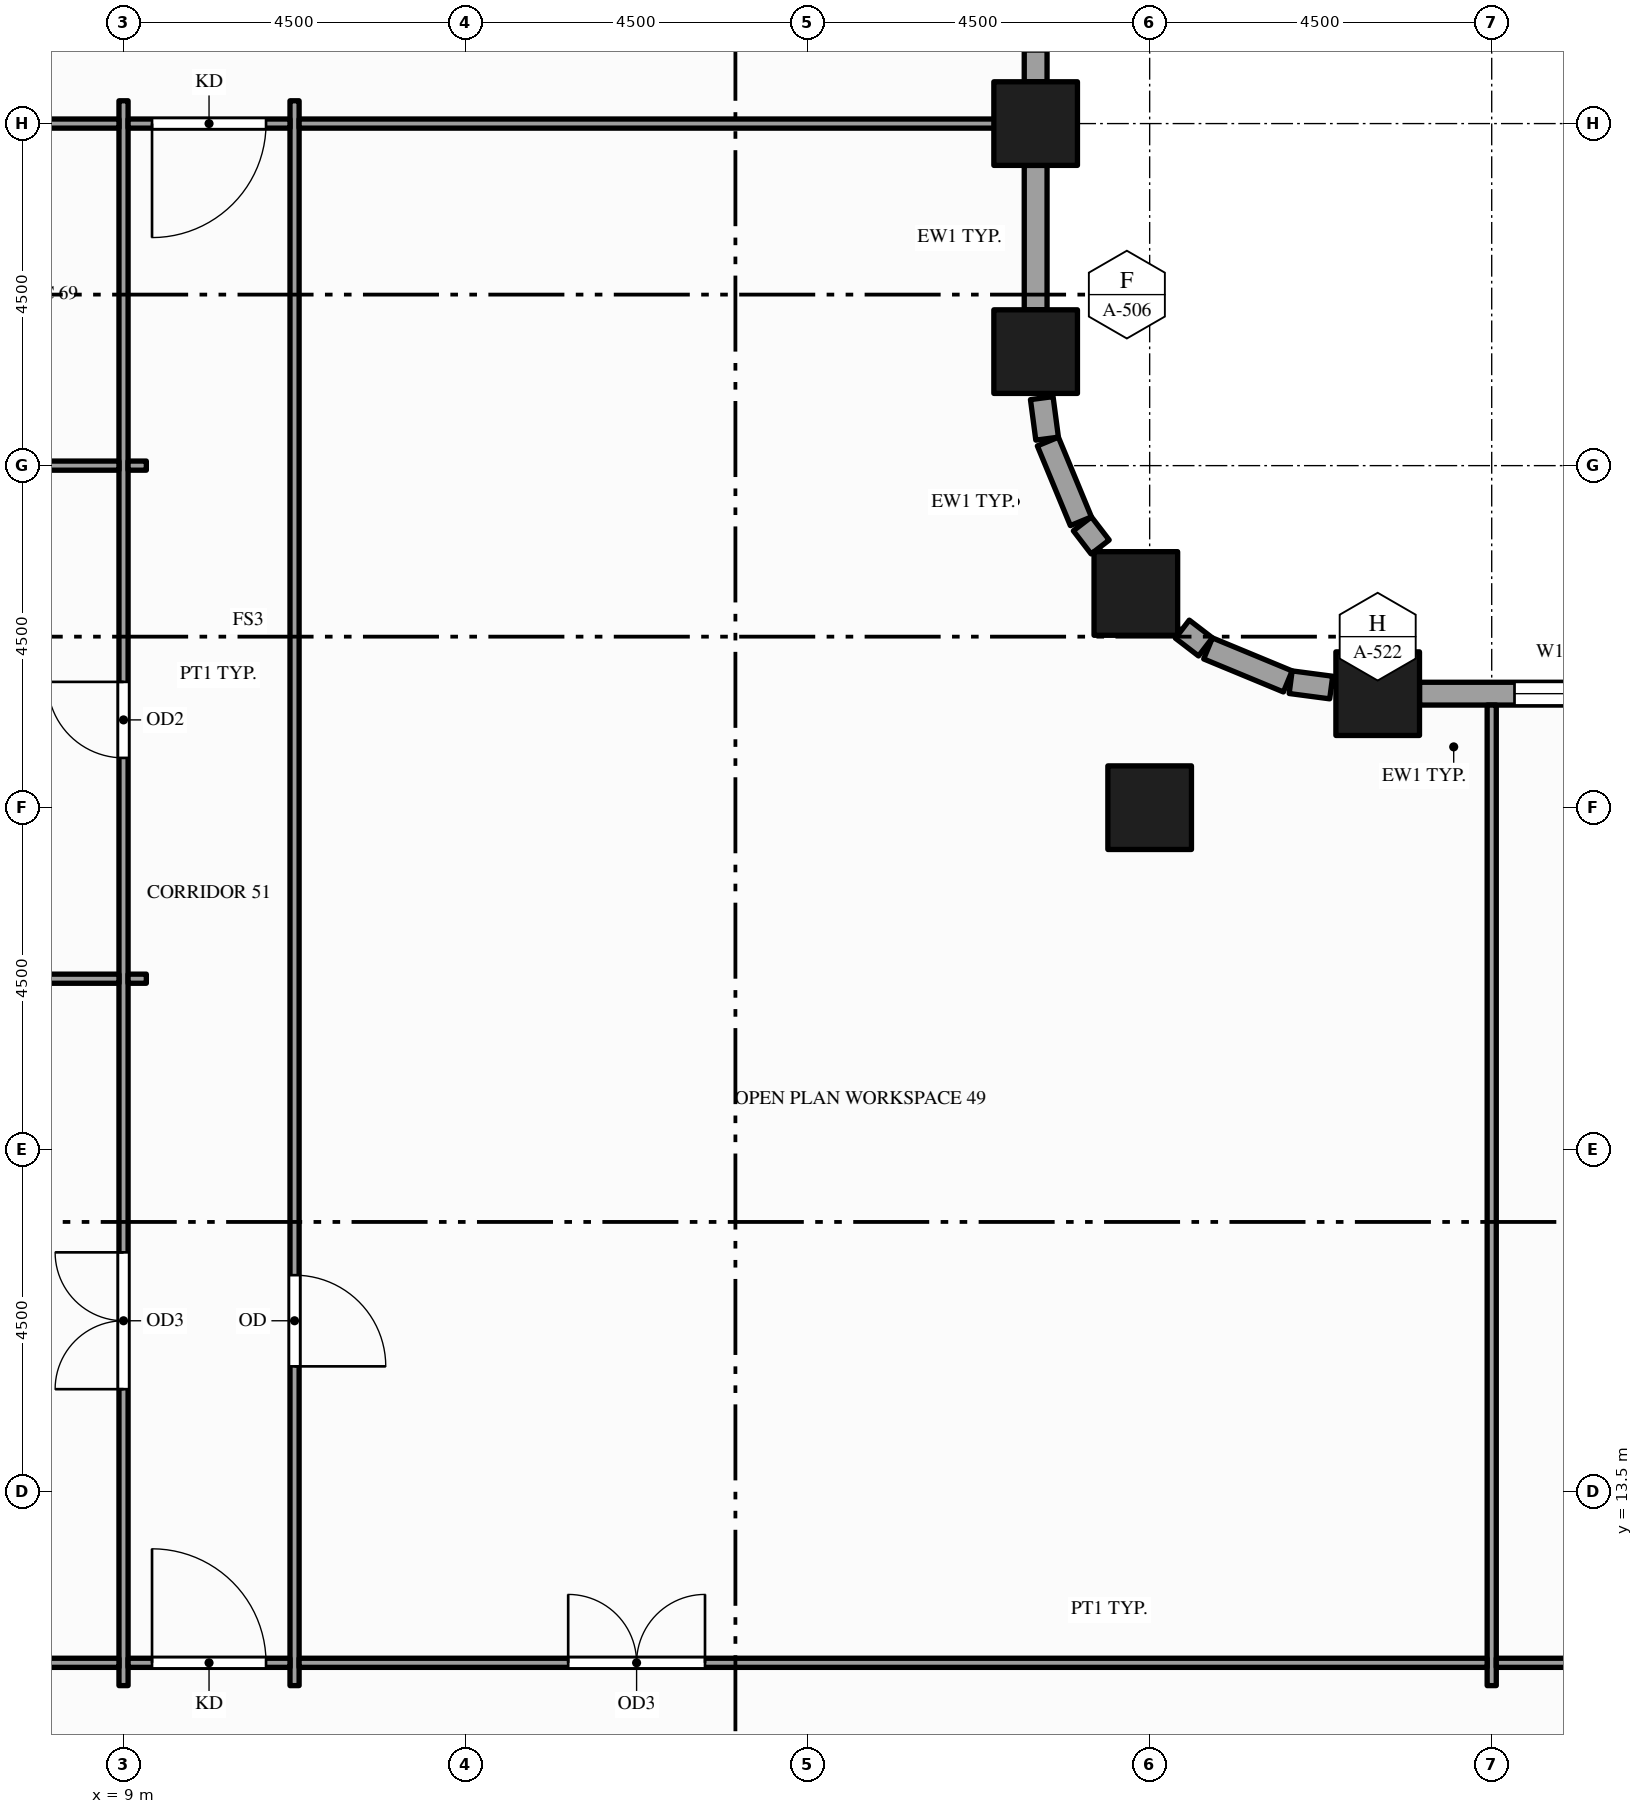
"""IFC4 building model, lengths in metres.
Left out: names, types, materials, properties, quantities, classifications, styles, units other than length and angle.
Written with IfcOpenShell. Run it as: python <this file> out.ifc"""

import sys

from ifc_helpers import new_model, si_unit, direction, frame, frame_2d, origin, origin_2d, place, context, subcontext, project, spatial, rectangle, hollow_rectangle, extrude, element, fill, save


model = new_model("IFC4")
c1 = context("Model", 3, precision=1e-05, world=origin(), true_north=direction((0.0, 1.0)))
c2 = subcontext(c1, "Body", "Model", "MODEL_VIEW")
j1 = project(units=[si_unit("LENGTHUNIT", "METRE"), si_unit("PLANEANGLEUNIT", "RADIAN")], contexts=[c1])
p1 = place(None, origin())
s1 = spatial("IfcSite", under=j1, at=p1, CompositionType="ELEMENT")
p2 = place(p1, origin())
s2 = spatial("IfcBuilding", under=s1, at=p2, CompositionType="ELEMENT")
p3 = place(p2, frame((0.0, 0.0, 73.0)))
s3 = spatial("IfcBuildingStorey", under=s2, at=p3, CompositionType="ELEMENT", Elevation=73.0)
for number, where, z_axis, x_axis in (
    (1, (21.0, 28.5, -0.15), (0.0, 0.0, 1.0), (1.0, 0.0, 0.0)),
    (2, (21.0, 31.5, -0.15), (0.0, 0.0, 1.0), (1.0, 0.0, 0.0)),
    (3, (22.318, 25.318, -0.15), (0.0, 0.0, 1.0), (1.0, 0.0, 0.0)),
    (4, (22.5, 22.5, -0.15), (0.0, 0.0, 1.0), (1.0, 0.0, 0.0)),
    (5, (25.5, 24.0, -0.15), (0.0, 0.0, 1.0), (1.0, 0.0, 0.0)),
):
    element("IfcColumn", number, at=place(p3, frame(where, z_axis=z_axis, x_axis=x_axis)), inside=s3, PredefinedType="COLUMN", context=c2, shape_type="SweptSolid", body=[
        extrude(hollow_rectangle(XDim=1.1, YDim=1.1, WallThickness=0.06, at=origin_2d()), origin(), (0.0, 0.0, 1.0), 3.9),
    ])
p4 = place(p3, frame((30.95, 24.0, 0.0), z_axis=(0.0, 0.0, 1.0), x_axis=(-1.0, 0.0, 0.0)))
e6 = element("IfcWall", 6, at=p4, inside=s3, PredefinedType="STANDARD", context=c2, shape_type="SweptSolid", body=[
    extrude(rectangle(XDim=4.9, YDim=0.3, at=frame_2d((2.45, 0.0))), origin(), (0.0, 0.0, 1.0), 3.044),
])
p5 = place(p4, frame((0.4, 0.0, 0.9)))
e7 = element("IfcOpeningElement", 7, at=p5, cuts=e6, PredefinedType="OPENING", context=c2, shape_type="SweptSolid", body=[
    extrude(rectangle(XDim=1.0, YDim=2.0, at=frame_2d((0.5, 1.0))), frame((0.0, 0.16, 0.0), z_axis=(0.0, -1.0, 0.0), x_axis=(1.0, 0.0, 0.0)), (0.0, 0.0, 1.0), 0.32),
])
p6 = place(p4, frame((2.0, 0.0, 0.9)))
e8 = element("IfcOpeningElement", 8, at=p6, cuts=e6, PredefinedType="OPENING", context=c2, shape_type="SweptSolid", body=[
    extrude(rectangle(XDim=1.65, YDim=2.0, at=frame_2d((0.825, 1.0))), frame((0.0, 0.16, 0.0), z_axis=(0.0, -1.0, 0.0), x_axis=(1.0, 0.0, 0.0)), (0.0, 0.0, 1.0), 0.32),
])
p7 = place(p3, frame((24.888, 24.081, 0.0), z_axis=(0.0, 0.0, 1.0), x_axis=(-0.991417173479, 0.130736330569, 0.0)))
e9 = element("IfcWall", 9, at=p7, inside=s3, PredefinedType="STANDARD", context=c2, shape_type="SweptSolid", body=[
    extrude(rectangle(XDim=0.538, YDim=0.3, at=frame_2d((0.269, 0.0))), origin(), (0.0, 0.0, 1.0), 2.35),
])
p8 = place(p3, frame((24.317, 24.161, 0.0), z_axis=(0.0, 0.0, 1.0), x_axis=(-0.923914616768, 0.382598720491, 0.0)))
e10 = element("IfcWall", 10, at=p8, inside=s3, PredefinedType="STANDARD", context=c2, shape_type="SweptSolid", body=[
    extrude(rectangle(XDim=1.135, YDim=0.3, at=frame_2d((0.568, 0.0))), origin(), (0.0, 0.0, 1.0), 2.35),
])
for number, where, z_axis, x_axis in (
    (11, (23.234, 24.615, 0.0), (0.0, 0.0, 1.0), (-0.794, 0.609, 0.0)),
    (12, (21.849, 25.93, 0.0), (0.0, 0.0, 1.0), (-0.609, 0.794, 0.0)),
):
    element("IfcWall", number, at=place(p3, frame(where, z_axis=z_axis, x_axis=x_axis)), inside=s3, PredefinedType="STANDARD", context=c2, shape_type="SweptSolid", body=[
        extrude(rectangle(XDim=0.384, YDim=0.3, at=frame_2d((0.192, 0.0))), origin(), (0.0, 0.0, 1.0), 3.044),
    ])
p9 = place(p3, frame((21.595, 26.268, 0.0), z_axis=(0.0, 0.0, 1.0), x_axis=(-0.382598720491, 0.923914616768, 0.0)))
e13 = element("IfcWall", 13, at=p9, inside=s3, PredefinedType="STANDARD", context=c2, shape_type="SweptSolid", body=[
    extrude(rectangle(XDim=1.135, YDim=0.3, at=frame_2d((0.568, 0.0))), origin(), (0.0, 0.0, 1.0), 3.044),
])
p10 = place(p3, frame((21.151, 27.355, 0.0), z_axis=(0.0, 0.0, 1.0), x_axis=(-0.130736330569, 0.991417173479, 0.0)))
e14 = element("IfcWall", 14, at=p10, inside=s3, PredefinedType="STANDARD", context=c2, shape_type="SweptSolid", body=[
    extrude(rectangle(XDim=0.538, YDim=0.3, at=frame_2d((0.269, 0.0))), origin(), (0.0, 0.0, 1.0), 3.044),
])
p11 = place(p3, frame((21.0, 29.05, 0.0), z_axis=(0.0, 0.0, 1.0), x_axis=(0.0, 1.0, 0.0)))
e15 = element("IfcWall", 15, at=p11, inside=s3, PredefinedType="STANDARD", context=c2, shape_type="SweptSolid", body=[
    extrude(rectangle(XDim=1.9, YDim=0.3, at=frame_2d((0.95, 0.0))), origin(), (0.0, 0.0, 1.0), 3.044),
])
p12 = place(p3, frame((21.0, 32.05, 0.0), z_axis=(0.0, 0.0, 1.0), x_axis=(0.0, 1.0, 0.0)))
e16 = element("IfcWall", 16, at=p12, inside=s3, PredefinedType="STANDARD", context=c2, shape_type="SweptSolid", body=[
    extrude(rectangle(XDim=3.95, YDim=0.3, at=frame_2d((1.975, 0.0))), origin(), (0.0, 0.0, 1.0), 3.044),
])
p13 = place(p12, frame((0.4, 0.0, 0.9)))
e17 = element("IfcOpeningElement", 17, at=p13, cuts=e16, PredefinedType="OPENING", context=c2, shape_type="SweptSolid", body=[
    extrude(rectangle(XDim=1.0, YDim=2.0, at=frame_2d((0.5, 1.0))), frame((0.0, 0.16, 0.0), z_axis=(0.0, -1.0, 0.0), x_axis=(1.0, 0.0, 0.0)), (0.0, 0.0, 1.0), 0.32),
])
p14 = place(p12, frame((2.0, 0.0, 0.9)))
e18 = element("IfcOpeningElement", 18, at=p14, cuts=e16, PredefinedType="OPENING", context=c2, shape_type="SweptSolid", body=[
    extrude(rectangle(XDim=1.55, YDim=2.0, at=frame_2d((0.775, 1.0))), frame((0.0, 0.16, 0.0), z_axis=(0.0, -1.0, 0.0), x_axis=(1.0, 0.0, 0.0)), (0.0, 0.0, 1.0), 0.32),
])
p15 = place(p3, frame((9.0, 10.95, 0.0), z_axis=(0.0, 0.0, 1.0), x_axis=(0.0, 1.0, 0.0)))
e19 = element("IfcWall", 19, at=p15, inside=s3, PredefinedType="PARTITIONING", context=c2, shape_type="SweptSolid", body=[
    extrude(rectangle(XDim=20.85, YDim=0.12, at=frame_2d((10.425, 0.0))), origin(), (0.0, 0.0, 1.0), 2.5),
])
p16 = place(p15, frame((3.9, 0.0, 0.0)))
e20 = element("IfcOpeningElement", 20, at=p16, cuts=e19, PredefinedType="OPENING", context=c2, shape_type="SweptSolid", body=[
    extrude(rectangle(XDim=1.8, YDim=2.1, at=frame_2d((0.9, 1.05))), frame((0.0, 0.07, 0.0), z_axis=(0.0, -1.0, 0.0), x_axis=(1.0, 0.0, 0.0)), (0.0, 0.0, 1.0), 0.14),
])
p17 = place(p15, frame((12.205, 0.0, 0.0)))
e21 = element("IfcOpeningElement", 21, at=p17, cuts=e19, PredefinedType="OPENING", context=c2, shape_type="SweptSolid", body=[
    extrude(rectangle(XDim=1.0, YDim=2.1, at=frame_2d((0.5, 1.05))), frame((0.0, 0.07, 0.0), z_axis=(0.0, -1.0, 0.0), x_axis=(1.0, 0.0, 0.0)), (0.0, 0.0, 1.0), 0.14),
])
p18 = place(p3, frame((11.25, 10.95, 0.0), z_axis=(0.0, 0.0, 1.0), x_axis=(0.0, 1.0, 0.0)))
e22 = element("IfcWall", 22, at=p18, inside=s3, PredefinedType="PARTITIONING", context=c2, shape_type="SweptSolid", body=[
    extrude(rectangle(XDim=20.85, YDim=0.12, at=frame_2d((10.425, 0.0))), origin(), (0.0, 0.0, 1.0), 2.5),
])
p19 = place(p18, frame((4.2, 0.0, 0.0)))
e23 = element("IfcOpeningElement", 23, at=p19, cuts=e22, PredefinedType="OPENING", context=c2, shape_type="SweptSolid", body=[
    extrude(rectangle(XDim=1.2, YDim=2.1, at=frame_2d((0.6, 1.05))), frame((0.0, 0.07, 0.0), z_axis=(0.0, -1.0, 0.0), x_axis=(1.0, 0.0, 0.0)), (0.0, 0.0, 1.0), 0.14),
])
p20 = place(p3, frame((27.0, 10.95, 0.0), z_axis=(0.0, 0.0, 1.0), x_axis=(0.0, 1.0, 0.0)))
e24 = element("IfcWall", 24, at=p20, inside=s3, PredefinedType="PARTITIONING", context=c2, shape_type="SweptSolid", body=[
    extrude(rectangle(XDim=12.9, YDim=0.12, at=frame_2d((6.45, 0.0))), origin(), (0.0, 0.0, 1.0), 2.35),
])
p21 = place(p3, frame((0.15, 11.25, 0.0), z_axis=(0.0, 0.0, 1.0), x_axis=(1.0, 0.0, 0.0)))
e25 = element("IfcWall", 25, at=p21, inside=s3, PredefinedType="PARTITIONING", context=c2, shape_type="SweptSolid", body=[
    extrude(rectangle(XDim=8.79, YDim=0.12, at=frame_2d((4.395, 0.0))), origin(), (0.0, 0.0, 1.0), 2.838),
])
p22 = place(p3, frame((9.06, 11.25, 0.0), z_axis=(0.0, 0.0, 1.0), x_axis=(1.0, 0.0, 0.0)))
e26 = element("IfcWall", 26, at=p22, inside=s3, PredefinedType="PARTITIONING", context=c2, shape_type="SweptSolid", body=[
    extrude(rectangle(XDim=2.13, YDim=0.12, at=frame_2d((1.065, 0.0))), origin(), (0.0, 0.0, 1.0), 2.838),
])
p23 = place(p22, frame((0.315, 0.0, 0.0)))
e27 = element("IfcOpeningElement", 27, at=p23, cuts=e26, PredefinedType="OPENING", context=c2, shape_type="SweptSolid", body=[
    extrude(rectangle(XDim=1.5, YDim=2.1, at=frame_2d((0.75, 1.05))), frame((0.0, 0.07, 0.0), z_axis=(0.0, -1.0, 0.0), x_axis=(1.0, 0.0, 0.0)), (0.0, 0.0, 1.0), 0.14),
])
p24 = place(p3, frame((11.31, 11.25, 0.0), z_axis=(0.0, 0.0, 1.0), x_axis=(1.0, 0.0, 0.0)))
e28 = element("IfcWall", 28, at=p24, inside=s3, PredefinedType="PARTITIONING", context=c2, shape_type="SweptSolid", body=[
    extrude(rectangle(XDim=15.63, YDim=0.12, at=frame_2d((7.815, 0.0))), origin(), (0.0, 0.0, 1.0), 2.838),
])
p25 = place(p24, frame((3.54, 0.0, 0.0)))
e29 = element("IfcOpeningElement", 29, at=p25, cuts=e28, PredefinedType="OPENING", context=c2, shape_type="SweptSolid", body=[
    extrude(rectangle(XDim=1.8, YDim=2.1, at=frame_2d((0.9, 1.05))), frame((0.0, 0.07, 0.0), z_axis=(0.0, -1.0, 0.0), x_axis=(1.0, 0.0, 0.0)), (0.0, 0.0, 1.0), 0.14),
])
p26 = place(p3, frame((27.06, 11.25, 0.0), z_axis=(0.0, 0.0, 1.0), x_axis=(1.0, 0.0, 0.0)))
e30 = element("IfcWall", 30, at=p26, inside=s3, PredefinedType="PARTITIONING", context=c2, shape_type="SweptSolid", body=[
    extrude(rectangle(XDim=4.38, YDim=0.12, at=frame_2d((2.19, 0.0))), origin(), (0.0, 0.0, 1.0), 2.838),
])
p27 = place(p26, frame((1.59, 0.0, 0.0)))
e31 = element("IfcOpeningElement", 31, at=p27, cuts=e30, PredefinedType="OPENING", context=c2, shape_type="SweptSolid", body=[
    extrude(rectangle(XDim=1.2, YDim=2.1, at=frame_2d((0.6, 1.05))), frame((0.0, 0.07, 0.0), z_axis=(0.0, -1.0, 0.0), x_axis=(1.0, 0.0, 0.0)), (0.0, 0.0, 1.0), 0.14),
])
p28 = place(p3, frame((0.15, 20.25, 0.0), z_axis=(0.0, 0.0, 1.0), x_axis=(1.0, 0.0, 0.0)))
e32 = element("IfcWall", 32, at=p28, inside=s3, PredefinedType="PARTITIONING", context=c2, shape_type="SweptSolid", body=[
    extrude(rectangle(XDim=8.79, YDim=0.12, at=frame_2d((4.395, 0.0))), origin(), (0.0, 0.0, 1.0), 2.838),
])
p29 = place(p3, frame((9.06, 20.25, 0.0), z_axis=(0.0, 0.0, 1.0), x_axis=(1.0, 0.0, 0.0)))
e33 = element("IfcWall", 33, at=p29, inside=s3, PredefinedType="PARTITIONING", context=c2, shape_type="SweptSolid", body=[
    extrude(rectangle(XDim=0.24, YDim=0.12, at=frame_2d((0.12, 0.0))), origin(), (0.0, 0.0, 1.0), 2.838),
])
p30 = place(p3, frame((5.56, 27.0, 0.0), z_axis=(0.0, 0.0, 1.0), x_axis=(1.0, 0.0, 0.0)))
e34 = element("IfcWall", 34, at=p30, inside=s3, PredefinedType="PARTITIONING", context=c2, shape_type="SweptSolid", body=[
    extrude(rectangle(XDim=3.38, YDim=0.12, at=frame_2d((1.69, 0.0))), origin(), (0.0, 0.0, 1.0), 2.838),
])
p31 = place(p3, frame((9.06, 27.0, 0.0), z_axis=(0.0, 0.0, 1.0), x_axis=(1.0, 0.0, 0.0)))
e35 = element("IfcWall", 35, at=p31, inside=s3, PredefinedType="PARTITIONING", context=c2, shape_type="SweptSolid", body=[
    extrude(rectangle(XDim=0.24, YDim=0.12, at=frame_2d((0.12, 0.0))), origin(), (0.0, 0.0, 1.0), 2.838),
])
p32 = place(p3, frame((5.56, 31.5, 0.0), z_axis=(0.0, 0.0, 1.0), x_axis=(1.0, 0.0, 0.0)))
e36 = element("IfcWall", 36, at=p32, inside=s3, PredefinedType="PARTITIONING", context=c2, shape_type="SweptSolid", body=[
    extrude(rectangle(XDim=3.38, YDim=0.12, at=frame_2d((1.69, 0.0))), origin(), (0.0, 0.0, 1.0), 2.838),
])
p33 = place(p32, frame((1.19, 0.0, 0.0)))
e37 = element("IfcOpeningElement", 37, at=p33, cuts=e36, PredefinedType="OPENING", context=c2, shape_type="SweptSolid", body=[
    extrude(rectangle(XDim=1.0, YDim=2.1, at=frame_2d((0.5, 1.05))), frame((0.0, 0.07, 0.0), z_axis=(0.0, -1.0, 0.0), x_axis=(1.0, 0.0, 0.0)), (0.0, 0.0, 1.0), 0.14),
])
p34 = place(p3, frame((9.06, 31.5, 0.0), z_axis=(0.0, 0.0, 1.0), x_axis=(1.0, 0.0, 0.0)))
e38 = element("IfcWall", 38, at=p34, inside=s3, PredefinedType="PARTITIONING", context=c2, shape_type="SweptSolid", body=[
    extrude(rectangle(XDim=2.13, YDim=0.12, at=frame_2d((1.065, 0.0))), origin(), (0.0, 0.0, 1.0), 2.838),
])
p35 = place(p34, frame((0.315, 0.0, 0.0)))
e39 = element("IfcOpeningElement", 39, at=p35, cuts=e38, PredefinedType="OPENING", context=c2, shape_type="SweptSolid", body=[
    extrude(rectangle(XDim=1.5, YDim=2.1, at=frame_2d((0.75, 1.05))), frame((0.0, 0.07, 0.0), z_axis=(0.0, -1.0, 0.0), x_axis=(1.0, 0.0, 0.0)), (0.0, 0.0, 1.0), 0.14),
])
p36 = place(p3, frame((11.31, 31.5, 0.0), z_axis=(0.0, 0.0, 1.0), x_axis=(1.0, 0.0, 0.0)))
e40 = element("IfcWall", 40, at=p36, inside=s3, PredefinedType="PARTITIONING", context=c2, shape_type="SweptSolid", body=[
    extrude(rectangle(XDim=9.54, YDim=0.12, at=frame_2d((4.77, 0.0))), origin(), (0.0, 0.0, 1.0), 2.838),
])
p37 = place(p6, origin())
e41 = element("IfcWindow", 41, at=p37, inside=s3, PartitioningType="SINGLE_PANEL", PredefinedType="WINDOW", context=c2, shape_type="SweptSolid", body=[
    extrude(rectangle(XDim=1.65, YDim=2.0, at=frame_2d((0.825, 1.0))), frame((0.0, 0.03, 0.0), z_axis=(0.0, -1.0, 0.0), x_axis=(1.0, 0.0, 0.0)), (0.0, 0.0, 1.0), 0.06),
])
fill(e8, e41)
p38 = place(p25, origin())
e42 = element("IfcDoor", 42, at=p38, inside=s3, OperationType="DOUBLE_DOOR_SINGLE_SWING", PredefinedType="DOOR", context=c2, shape_type="SweptSolid", body=[
    extrude(rectangle(XDim=1.8, YDim=2.1, at=frame_2d((0.9, 1.05))), frame((0.0, 0.025, 0.0), z_axis=(0.0, -1.0, 0.0), x_axis=(1.0, 0.0, 0.0)), (0.0, 0.0, 1.0), 0.05),
])
fill(e29, e42)
p39 = place(p23, origin())
e43 = element("IfcDoor", 43, at=p39, inside=s3, OperationType="SINGLE_SWING_LEFT", PredefinedType="DOOR", context=c2, shape_type="SweptSolid", body=[
    extrude(rectangle(XDim=1.5, YDim=2.1, at=frame_2d((0.75, 1.05))), frame((0.0, 0.025, 0.0), z_axis=(0.0, -1.0, 0.0), x_axis=(1.0, 0.0, 0.0)), (0.0, 0.0, 1.0), 0.05),
])
fill(e27, e43)
p40 = place(p35, origin())
e44 = element("IfcDoor", 44, at=p40, inside=s3, OperationType="SINGLE_SWING_LEFT", PredefinedType="DOOR", context=c2, shape_type="SweptSolid", body=[
    extrude(rectangle(XDim=1.5, YDim=2.1, at=frame_2d((0.75, 1.05))), frame((0.0, 0.025, 0.0), z_axis=(0.0, -1.0, 0.0), x_axis=(1.0, 0.0, 0.0)), (0.0, 0.0, 1.0), 0.05),
])
fill(e39, e44)
p41 = place(p16, origin())
e45 = element("IfcDoor", 45, at=p41, inside=s3, OperationType="DOUBLE_DOOR_SINGLE_SWING", PredefinedType="DOOR", context=c2, shape_type="SweptSolid", body=[
    extrude(rectangle(XDim=1.8, YDim=2.1, at=frame_2d((0.9, 1.05))), frame((0.0, 0.025, 0.0), z_axis=(0.0, -1.0, 0.0), x_axis=(1.0, 0.0, 0.0)), (0.0, 0.0, 1.0), 0.05),
])
fill(e20, e45)
p42 = place(p17, origin())
e46 = element("IfcDoor", 46, at=p42, inside=s3, OperationType="SINGLE_SWING_RIGHT", PredefinedType="DOOR", context=c2, shape_type="SweptSolid", body=[
    extrude(rectangle(XDim=1.0, YDim=2.1, at=frame_2d((0.5, 1.05))), frame((0.0, 0.025, 0.0), z_axis=(0.0, -1.0, 0.0), x_axis=(1.0, 0.0, 0.0)), (0.0, 0.0, 1.0), 0.05),
])
fill(e21, e46)
p43 = place(p19, origin())
e47 = element("IfcDoor", 47, at=p43, inside=s3, OperationType="SINGLE_SWING_LEFT", PredefinedType="DOOR", context=c2, shape_type="SweptSolid", body=[
    extrude(rectangle(XDim=1.2, YDim=2.1, at=frame_2d((0.6, 1.05))), frame((0.0, 0.025, 0.0), z_axis=(0.0, -1.0, 0.0), x_axis=(1.0, 0.0, 0.0)), (0.0, 0.0, 1.0), 0.05),
])
fill(e23, e47)
save(model, sys.argv[1])
